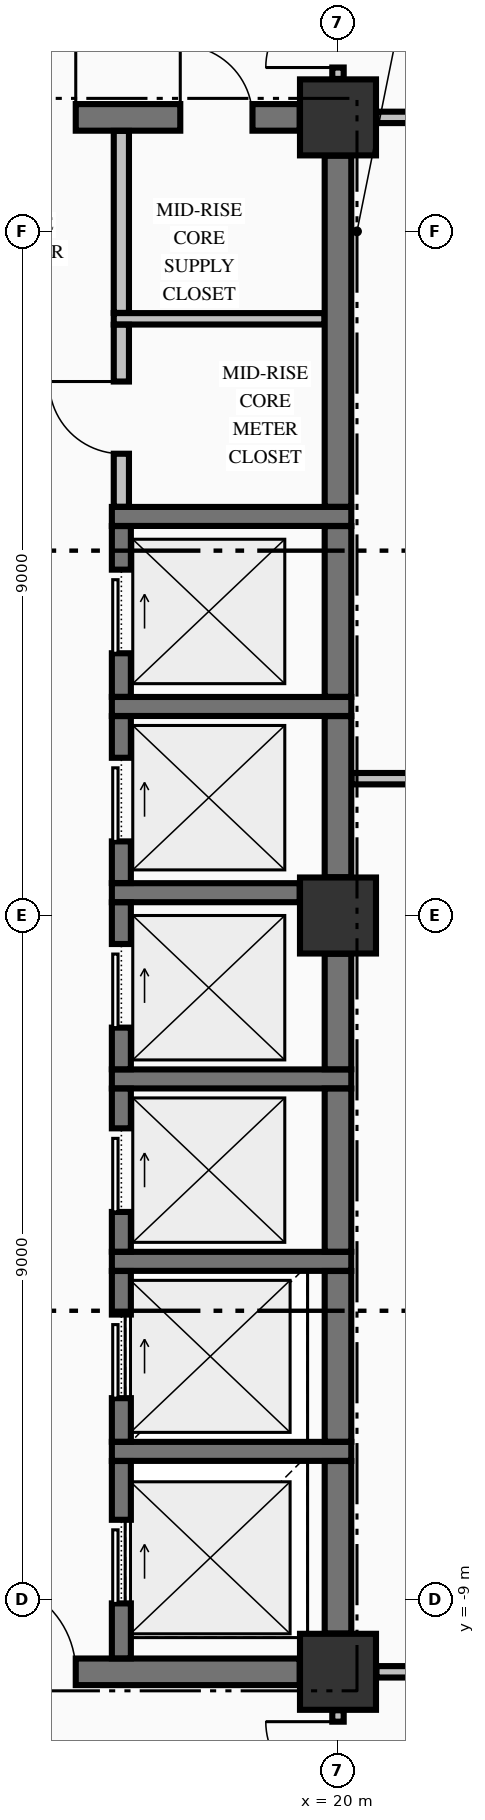
"""IFC4 building model, lengths in metres.
Left out: names, types, materials, properties, quantities, classifications, styles, units other than length and angle.
Written with IfcOpenShell. Run it as: python <this file> out.ifc"""

import sys

from ifc_helpers import new_model, si_unit, direction, frame, frame_2d, origin, origin_2d, place, context, subcontext, project, spatial, rectangle, extrude, element, fill, save


model = new_model("IFC4")
c1 = context("Model", 3, precision=1e-05, world=origin(), true_north=direction((0.0, 1.0)))
c2 = subcontext(c1, "Body", "Model", "MODEL_VIEW")
j1 = project(units=[si_unit("LENGTHUNIT", "METRE"), si_unit("PLANEANGLEUNIT", "RADIAN")], contexts=[c1])
p1 = place(None, origin())
s1 = spatial("IfcSite", under=j1, at=p1, CompositionType="ELEMENT")
p2 = place(p1, origin())
s2 = spatial("IfcBuilding", under=s1, at=p2, CompositionType="ELEMENT")
p3 = place(p2, frame((0.0, 0.0, 86.94)))
s3 = spatial("IfcBuildingStorey", under=s2, at=p3, CompositionType="ELEMENT", Elevation=86.94)
for number, where, z_axis, x_axis in (
    (1, (20.0, -9.95, -0.425), (0.0, 0.0, 1.0), (1.0, 0.0, 0.0)),
    (2, (20.0, 10.5, -0.425), (0.0, 0.0, 1.0), (1.0, 0.0, 0.0)),
    (3, (20.0, 0.0, -0.425), (0.0, 0.0, 1.0), (1.0, 0.0, 0.0)),
):
    element("IfcColumn", number, at=place(p3, frame(where, z_axis=z_axis, x_axis=x_axis)), inside=s3, PredefinedType="COLUMN", context=c2, shape_type="SweptSolid", body=[
        extrude(rectangle(XDim=1.0, YDim=1.0, at=origin_2d()), origin(), (0.0, 0.0, 1.0), 4.595),
    ])
p4 = place(p3, frame((14.7, -9.95, 0.0), z_axis=(0.0, 0.0, 1.0), x_axis=(1.0, 0.0, 0.0)))
e4 = element("IfcWall", 4, at=p4, inside=s3, PredefinedType="SHEAR", context=c2, shape_type="SweptSolid", body=[
    extrude(rectangle(XDim=4.796, YDim=0.35, at=frame_2d((2.398, 0.0))), origin(), (0.0, 0.0, 1.0), 4.17),
])
p5 = place(p4, frame((0.65, 0.0, 0.0)))
e5 = element("IfcOpeningElement", 5, at=p5, cuts=e4, PredefinedType="OPENING", context=c2, shape_type="SweptSolid", body=[
    extrude(rectangle(XDim=1.2, YDim=2.15, at=frame_2d((0.6, 1.075))), frame((0.0, 0.185, 0.0), z_axis=(0.0, -1.0, 0.0), x_axis=(1.0, 0.0, 0.0)), (0.0, 0.0, 1.0), 0.37),
])
for number, where, z_axis, x_axis in (
    (6, (17.025, -7.05, 0.0), (0.0, 0.0, 1.0), (1.0, 0.0, 0.0)),
    (7, (17.025, -4.55, 0.0), (0.0, 0.0, 1.0), (1.0, 0.0, 0.0)),
    (8, (17.025, -2.15, 0.0), (0.0, 0.0, 1.0), (1.0, 0.0, 0.0)),
):
    element("IfcWall", number, at=place(p3, frame(where, z_axis=z_axis, x_axis=x_axis)), inside=s3, PredefinedType="SOLIDWALL", context=c2, shape_type="SweptSolid", body=[
        extrude(rectangle(XDim=3.15, YDim=0.25, at=frame_2d((1.575, 0.0))), origin(), (0.0, 0.0, 1.0), 4.17),
    ])
p6 = place(p3, frame((17.025, 0.3, 0.0), z_axis=(0.0, 0.0, 1.0), x_axis=(1.0, 0.0, 0.0)))
e9 = element("IfcWall", 9, at=p6, inside=s3, PredefinedType="SOLIDWALL", context=c2, shape_type="SweptSolid", body=[
    extrude(rectangle(XDim=2.471, YDim=0.25, at=frame_2d((1.236, 0.0))), origin(), (0.0, 0.0, 1.0), 4.17),
])
for number, where, z_axis, x_axis in (
    (10, (17.025, 2.75, 0.0), (0.0, 0.0, 1.0), (1.0, 0.0, 0.0)),
    (11, (17.025, 5.25, 0.0), (0.0, 0.0, 1.0), (1.0, 0.0, 0.0)),
):
    element("IfcWall", number, at=place(p3, frame(where, z_axis=z_axis, x_axis=x_axis)), inside=s3, PredefinedType="SOLIDWALL", context=c2, shape_type="SweptSolid", body=[
        extrude(rectangle(XDim=3.15, YDim=0.25, at=frame_2d((1.575, 0.0))), origin(), (0.0, 0.0, 1.0), 4.17),
    ])
p7 = place(p3, frame((14.7, 10.5, 0.0), z_axis=(0.0, 0.0, 1.0), x_axis=(1.0, 0.0, 0.0)))
e12 = element("IfcWall", 12, at=p7, inside=s3, PredefinedType="SHEAR", context=c2, shape_type="SweptSolid", body=[
    extrude(rectangle(XDim=4.796, YDim=0.35, at=frame_2d((2.398, 0.0))), origin(), (0.0, 0.0, 1.0), 4.17),
])
p8 = place(p7, frame((0.65, 0.0, 0.0)))
e13 = element("IfcOpeningElement", 13, at=p8, cuts=e12, PredefinedType="OPENING", context=c2, shape_type="SweptSolid", body=[
    extrude(rectangle(XDim=1.2, YDim=2.15, at=frame_2d((0.6, 1.075))), frame((0.0, 0.185, 0.0), z_axis=(0.0, -1.0, 0.0), x_axis=(1.0, 0.0, 0.0)), (0.0, 0.0, 1.0), 0.37),
])
p9 = place(p7, frame((3.225, 0.0, 0.0)))
e14 = element("IfcOpeningElement", 14, at=p9, cuts=e12, PredefinedType="OPENING", context=c2, shape_type="SweptSolid", body=[
    extrude(rectangle(XDim=0.95, YDim=2.15, at=frame_2d((0.475, 1.075))), frame((0.0, 0.185, 0.0), z_axis=(0.0, -1.0, 0.0), x_axis=(1.0, 0.0, 0.0)), (0.0, 0.0, 1.0), 0.37),
])
p10 = place(p3, frame((20.506, -9.95, 0.0), z_axis=(0.0, 0.0, 1.0), x_axis=(1.0, 0.0, 0.0)))
e15 = element("IfcWall", 15, at=p10, inside=s3, PredefinedType="PARTITIONING", context=c2, shape_type="SweptSolid", body=[
    extrude(rectangle(XDim=7.329, YDim=0.15, at=frame_2d((3.665, 0.0))), origin(), (0.0, 0.0, 1.0), 4.17),
])
p11 = place(p10, frame((3.019, 0.0, 0.0)))
e16 = element("IfcOpeningElement", 16, at=p11, cuts=e15, PredefinedType="OPENING", context=c2, shape_type="SweptSolid", body=[
    extrude(rectangle(XDim=0.95, YDim=2.15, at=frame_2d((0.475, 1.075))), frame((0.0, 0.085, 0.0), z_axis=(0.0, -1.0, 0.0), x_axis=(1.0, 0.0, 0.0)), (0.0, 0.0, 1.0), 0.17),
])
p12 = place(p3, frame((20.178, 1.8, 0.0), z_axis=(0.0, 0.0, 1.0), x_axis=(1.0, 0.0, 0.0)))
e17 = element("IfcWall", 17, at=p12, inside=s3, PredefinedType="PARTITIONING", context=c2, shape_type="SweptSolid", body=[
    extrude(rectangle(XDim=7.762, YDim=0.15, at=frame_2d((3.881, 0.0))), origin(), (0.0, 0.0, 1.0), 4.17),
])
p13 = place(p3, frame((17.05, 7.85, 0.0), z_axis=(0.0, 0.0, 1.0), x_axis=(1.0, 0.0, 0.0)))
e18 = element("IfcWall", 18, at=p13, inside=s3, PredefinedType="PARTITIONING", context=c2, shape_type="SweptSolid", body=[
    extrude(rectangle(XDim=2.772, YDim=0.15, at=frame_2d((1.386, 0.0))), origin(), (0.0, 0.0, 1.0), 4.17),
])
p14 = place(p3, frame((20.506, 10.5, 0.0), z_axis=(0.0, 0.0, 1.0), x_axis=(1.0, 0.0, 0.0)))
e19 = element("IfcWall", 19, at=p14, inside=s3, PredefinedType="PARTITIONING", context=c2, shape_type="SweptSolid", body=[
    extrude(rectangle(XDim=7.329, YDim=0.15, at=frame_2d((3.665, 0.0))), origin(), (0.0, 0.0, 1.0), 4.17),
])
p15 = place(p14, frame((3.019, 0.0, 0.0)))
e20 = element("IfcOpeningElement", 20, at=p15, cuts=e19, PredefinedType="OPENING", context=c2, shape_type="SweptSolid", body=[
    extrude(rectangle(XDim=0.95, YDim=2.15, at=frame_2d((0.475, 1.075))), frame((0.0, 0.085, 0.0), z_axis=(0.0, -1.0, 0.0), x_axis=(1.0, 0.0, 0.0)), (0.0, 0.0, 1.0), 0.17),
])
p16 = place(p3, frame((17.15, -9.773, 0.0), z_axis=(0.0, 0.0, 1.0), x_axis=(0.0, 1.0, 0.0)))
e21 = element("IfcWall", 21, at=p16, inside=s3, PredefinedType="SOLIDWALL", context=c2, shape_type="SweptSolid", body=[
    extrude(rectangle(XDim=2.596, YDim=0.25, at=frame_2d((1.298, 0.0))), origin(), (0.0, 0.0, 1.0), 4.17),
])
p17 = place(p16, frame((0.723, 0.0, 0.0)))
e22 = element("IfcOpeningElement", 22, at=p17, cuts=e21, PredefinedType="OPENING", context=c2, shape_type="SweptSolid", body=[
    extrude(rectangle(XDim=1.1, YDim=2.2, at=frame_2d((0.55, 1.1))), frame((0.0, 0.135, 0.0), z_axis=(0.0, -1.0, 0.0), x_axis=(1.0, 0.0, 0.0)), (0.0, 0.0, 1.0), 0.27),
])
p18 = place(p3, frame((17.15, -6.923, 0.0), z_axis=(0.0, 0.0, 1.0), x_axis=(0.0, 1.0, 0.0)))
e23 = element("IfcWall", 23, at=p18, inside=s3, PredefinedType="SOLIDWALL", context=c2, shape_type="SweptSolid", body=[
    extrude(rectangle(XDim=2.246, YDim=0.25, at=frame_2d((1.123, 0.0))), origin(), (0.0, 0.0, 1.0), 4.17),
])
p19 = place(p18, frame((0.573, 0.0, 0.0)))
e24 = element("IfcOpeningElement", 24, at=p19, cuts=e23, PredefinedType="OPENING", context=c2, shape_type="SweptSolid", body=[
    extrude(rectangle(XDim=1.1, YDim=2.2, at=frame_2d((0.55, 1.1))), frame((0.0, 0.135, 0.0), z_axis=(0.0, -1.0, 0.0), x_axis=(1.0, 0.0, 0.0)), (0.0, 0.0, 1.0), 0.27),
])
p20 = place(p3, frame((17.15, -4.423, 0.0), z_axis=(0.0, 0.0, 1.0), x_axis=(0.0, 1.0, 0.0)))
e25 = element("IfcWall", 25, at=p20, inside=s3, PredefinedType="SOLIDWALL", context=c2, shape_type="SweptSolid", body=[
    extrude(rectangle(XDim=2.146, YDim=0.25, at=frame_2d((1.073, 0.0))), origin(), (0.0, 0.0, 1.0), 4.17),
])
p21 = place(p20, frame((0.523, 0.0, 0.0)))
e26 = element("IfcOpeningElement", 26, at=p21, cuts=e25, PredefinedType="OPENING", context=c2, shape_type="SweptSolid", body=[
    extrude(rectangle(XDim=1.1, YDim=2.2, at=frame_2d((0.55, 1.1))), frame((0.0, 0.135, 0.0), z_axis=(0.0, -1.0, 0.0), x_axis=(1.0, 0.0, 0.0)), (0.0, 0.0, 1.0), 0.27),
])
p22 = place(p3, frame((17.15, -2.023, 0.0), z_axis=(0.0, 0.0, 1.0), x_axis=(0.0, 1.0, 0.0)))
e27 = element("IfcWall", 27, at=p22, inside=s3, PredefinedType="SOLIDWALL", context=c2, shape_type="SweptSolid", body=[
    extrude(rectangle(XDim=2.196, YDim=0.25, at=frame_2d((1.098, 0.0))), origin(), (0.0, 0.0, 1.0), 4.17),
])
p23 = place(p22, frame((0.548, 0.0, 0.0)))
e28 = element("IfcOpeningElement", 28, at=p23, cuts=e27, PredefinedType="OPENING", context=c2, shape_type="SweptSolid", body=[
    extrude(rectangle(XDim=1.1, YDim=2.2, at=frame_2d((0.55, 1.1))), frame((0.0, 0.135, 0.0), z_axis=(0.0, -1.0, 0.0), x_axis=(1.0, 0.0, 0.0)), (0.0, 0.0, 1.0), 0.27),
])
p24 = place(p3, frame((17.15, 0.427, 0.0), z_axis=(0.0, 0.0, 1.0), x_axis=(0.0, 1.0, 0.0)))
e29 = element("IfcWall", 29, at=p24, inside=s3, PredefinedType="SOLIDWALL", context=c2, shape_type="SweptSolid", body=[
    extrude(rectangle(XDim=2.196, YDim=0.25, at=frame_2d((1.098, 0.0))), origin(), (0.0, 0.0, 1.0), 4.17),
])
p25 = place(p24, frame((0.548, 0.0, 0.0)))
e30 = element("IfcOpeningElement", 30, at=p25, cuts=e29, PredefinedType="OPENING", context=c2, shape_type="SweptSolid", body=[
    extrude(rectangle(XDim=1.1, YDim=2.2, at=frame_2d((0.55, 1.1))), frame((0.0, 0.135, 0.0), z_axis=(0.0, -1.0, 0.0), x_axis=(1.0, 0.0, 0.0)), (0.0, 0.0, 1.0), 0.27),
])
p26 = place(p3, frame((17.15, 2.877, 0.0), z_axis=(0.0, 0.0, 1.0), x_axis=(0.0, 1.0, 0.0)))
e31 = element("IfcWall", 31, at=p26, inside=s3, PredefinedType="SOLIDWALL", context=c2, shape_type="SweptSolid", body=[
    extrude(rectangle(XDim=2.246, YDim=0.25, at=frame_2d((1.123, 0.0))), origin(), (0.0, 0.0, 1.0), 4.17),
])
p27 = place(p26, frame((0.573, 0.0, 0.0)))
e32 = element("IfcOpeningElement", 32, at=p27, cuts=e31, PredefinedType="OPENING", context=c2, shape_type="SweptSolid", body=[
    extrude(rectangle(XDim=1.1, YDim=2.2, at=frame_2d((0.55, 1.1))), frame((0.0, 0.135, 0.0), z_axis=(0.0, -1.0, 0.0), x_axis=(1.0, 0.0, 0.0)), (0.0, 0.0, 1.0), 0.27),
])
p28 = place(p3, frame((20.0, -9.446, 0.0), z_axis=(0.0, 0.0, 1.0), x_axis=(0.0, 1.0, 0.0)))
e33 = element("IfcWall", 33, at=p28, inside=s3, PredefinedType="SHEAR", context=c2, shape_type="SweptSolid", body=[
    extrude(rectangle(XDim=2.269, YDim=0.35, at=frame_2d((1.135, 0.0))), origin(), (0.0, 0.0, 1.0), 4.17),
])
p29 = place(p3, frame((20.0, -6.923, 0.0), z_axis=(0.0, 0.0, 1.0), x_axis=(0.0, 1.0, 0.0)))
e34 = element("IfcWall", 34, at=p29, inside=s3, PredefinedType="SHEAR", context=c2, shape_type="SweptSolid", body=[
    extrude(rectangle(XDim=2.246, YDim=0.35, at=frame_2d((1.123, 0.0))), origin(), (0.0, 0.0, 1.0), 4.17),
])
p30 = place(p3, frame((20.0, -4.423, 0.0), z_axis=(0.0, 0.0, 1.0), x_axis=(0.0, 1.0, 0.0)))
e35 = element("IfcWall", 35, at=p30, inside=s3, PredefinedType="SHEAR", context=c2, shape_type="SweptSolid", body=[
    extrude(rectangle(XDim=2.146, YDim=0.35, at=frame_2d((1.073, 0.0))), origin(), (0.0, 0.0, 1.0), 4.17),
])
p31 = place(p3, frame((20.0, -2.023, 0.0), z_axis=(0.0, 0.0, 1.0), x_axis=(0.0, 1.0, 0.0)))
e36 = element("IfcWall", 36, at=p31, inside=s3, PredefinedType="SHEAR", context=c2, shape_type="SweptSolid", body=[
    extrude(rectangle(XDim=1.519, YDim=0.35, at=frame_2d((0.76, 0.0))), origin(), (0.0, 0.0, 1.0), 4.17),
])
p32 = place(p3, frame((20.0, 0.504, 0.0), z_axis=(0.0, 0.0, 1.0), x_axis=(0.0, 1.0, 0.0)))
e37 = element("IfcWall", 37, at=p32, inside=s3, PredefinedType="SHEAR", context=c2, shape_type="SweptSolid", body=[
    extrude(rectangle(XDim=2.119, YDim=0.35, at=frame_2d((1.06, 0.0))), origin(), (0.0, 0.0, 1.0), 4.17),
])
p33 = place(p3, frame((20.0, 2.877, 0.0), z_axis=(0.0, 0.0, 1.0), x_axis=(0.0, 1.0, 0.0)))
e38 = element("IfcWall", 38, at=p33, inside=s3, PredefinedType="SHEAR", context=c2, shape_type="SweptSolid", body=[
    extrude(rectangle(XDim=2.246, YDim=0.35, at=frame_2d((1.123, 0.0))), origin(), (0.0, 0.0, 1.0), 4.17),
])
p34 = place(p3, frame((20.0, 5.377, 0.0), z_axis=(0.0, 0.0, 1.0), x_axis=(0.0, 1.0, 0.0)))
e39 = element("IfcWall", 39, at=p34, inside=s3, PredefinedType="SHEAR", context=c2, shape_type="SweptSolid", body=[
    extrude(rectangle(XDim=4.619, YDim=0.35, at=frame_2d((2.31, 0.0))), origin(), (0.0, 0.0, 1.0), 4.17),
])
p35 = place(p3, frame((17.15, 5.378, 0.0), z_axis=(0.0, 0.0, 1.0), x_axis=(0.0, 1.0, 0.0)))
e40 = element("IfcWall", 40, at=p35, inside=s3, PredefinedType="PARTITIONING", context=c2, shape_type="SweptSolid", body=[
    extrude(rectangle(XDim=2.394, YDim=0.2, at=frame_2d((1.197, 0.0))), origin(), (0.0, 0.0, 1.0), 4.17),
])
p36 = place(p35, frame((0.697, 0.0, 0.0)))
e41 = element("IfcOpeningElement", 41, at=p36, cuts=e40, PredefinedType="OPENING", context=c2, shape_type="SweptSolid", body=[
    extrude(rectangle(XDim=0.95, YDim=2.15, at=frame_2d((0.475, 1.075))), frame((0.0, 0.11, 0.0), z_axis=(0.0, -1.0, 0.0), x_axis=(1.0, 0.0, 0.0)), (0.0, 0.0, 1.0), 0.22),
])
p37 = place(p3, frame((17.15, 7.928, 0.0), z_axis=(0.0, 0.0, 1.0), x_axis=(0.0, 1.0, 0.0)))
e42 = element("IfcWall", 42, at=p37, inside=s3, PredefinedType="PARTITIONING", context=c2, shape_type="SweptSolid", body=[
    extrude(rectangle(XDim=2.394, YDim=0.2, at=frame_2d((1.197, 0.0))), origin(), (0.0, 0.0, 1.0), 4.17),
])
p38 = place(p3, frame((20.0, -12.122, 0.0), z_axis=(0.0, 0.0, 1.0), x_axis=(0.0, 1.0, 0.0)))
e43 = element("IfcWall", 43, at=p38, inside=s3, PredefinedType="PARTITIONING", context=c2, shape_type="SweptSolid", body=[
    extrude(rectangle(XDim=1.666, YDim=0.15, at=frame_2d((0.833, 0.0))), origin(), (0.0, 0.0, 1.0), 3.36),
])
p39 = place(p38, frame((0.566, 0.0, 0.0)))
e44 = element("IfcOpeningElement", 44, at=p39, cuts=e43, PredefinedType="OPENING", context=c2, shape_type="SweptSolid", body=[
    extrude(rectangle(XDim=0.95, YDim=2.15, at=frame_2d((0.475, 1.075))), frame((0.0, 0.085, 0.0), z_axis=(0.0, -1.0, 0.0), x_axis=(1.0, 0.0, 0.0)), (0.0, 0.0, 1.0), 0.17),
])
p40 = place(p3, frame((20.0, 11.006, 0.0), z_axis=(0.0, 0.0, 1.0), x_axis=(0.0, 1.0, 0.0)))
e45 = element("IfcWall", 45, at=p40, inside=s3, PredefinedType="PARTITIONING", context=c2, shape_type="SweptSolid", body=[
    extrude(rectangle(XDim=1.466, YDim=0.15, at=frame_2d((0.733, 0.0))), origin(), (0.0, 0.0, 1.0), 3.36),
])
p41 = place(p40, frame((0.15, 0.0, 0.0)))
e46 = element("IfcOpeningElement", 46, at=p41, cuts=e45, PredefinedType="OPENING", context=c2, shape_type="SweptSolid", body=[
    extrude(rectangle(XDim=0.95, YDim=2.15, at=frame_2d((0.475, 1.075))), frame((0.0, 0.085, 0.0), z_axis=(0.0, -1.0, 0.0), x_axis=(1.0, 0.0, 0.0)), (0.0, 0.0, 1.0), 0.17),
])
p42 = place(p17, origin())
e47 = element("IfcDoor", 47, at=p42, inside=s3, OperationType="SLIDING_TO_RIGHT", PredefinedType="DOOR", context=c2, shape_type="SweptSolid", body=[
    extrude(rectangle(XDim=1.1, YDim=2.2, at=frame_2d((0.55, 1.1))), frame((0.0, 0.025, 0.0), z_axis=(0.0, -1.0, 0.0), x_axis=(1.0, 0.0, 0.0)), (0.0, 0.0, 1.0), 0.05),
])
fill(e22, e47)
p43 = place(p19, origin())
e48 = element("IfcDoor", 48, at=p43, inside=s3, OperationType="SLIDING_TO_RIGHT", PredefinedType="DOOR", context=c2, shape_type="SweptSolid", body=[
    extrude(rectangle(XDim=1.1, YDim=2.2, at=frame_2d((0.55, 1.1))), frame((0.0, 0.025, 0.0), z_axis=(0.0, -1.0, 0.0), x_axis=(1.0, 0.0, 0.0)), (0.0, 0.0, 1.0), 0.05),
])
fill(e24, e48)
p44 = place(p21, origin())
e49 = element("IfcDoor", 49, at=p44, inside=s3, OperationType="SLIDING_TO_RIGHT", PredefinedType="DOOR", context=c2, shape_type="SweptSolid", body=[
    extrude(rectangle(XDim=1.1, YDim=2.2, at=frame_2d((0.55, 1.1))), frame((0.0, 0.025, 0.0), z_axis=(0.0, -1.0, 0.0), x_axis=(1.0, 0.0, 0.0)), (0.0, 0.0, 1.0), 0.05),
])
fill(e26, e49)
p45 = place(p23, origin())
e50 = element("IfcDoor", 50, at=p45, inside=s3, OperationType="SLIDING_TO_RIGHT", PredefinedType="DOOR", context=c2, shape_type="SweptSolid", body=[
    extrude(rectangle(XDim=1.1, YDim=2.2, at=frame_2d((0.55, 1.1))), frame((0.0, 0.025, 0.0), z_axis=(0.0, -1.0, 0.0), x_axis=(1.0, 0.0, 0.0)), (0.0, 0.0, 1.0), 0.05),
])
fill(e28, e50)
p46 = place(p25, origin())
e51 = element("IfcDoor", 51, at=p46, inside=s3, OperationType="SLIDING_TO_RIGHT", PredefinedType="DOOR", context=c2, shape_type="SweptSolid", body=[
    extrude(rectangle(XDim=1.1, YDim=2.2, at=frame_2d((0.55, 1.1))), frame((0.0, 0.025, 0.0), z_axis=(0.0, -1.0, 0.0), x_axis=(1.0, 0.0, 0.0)), (0.0, 0.0, 1.0), 0.05),
])
fill(e30, e51)
p47 = place(p27, origin())
e52 = element("IfcDoor", 52, at=p47, inside=s3, OperationType="SLIDING_TO_RIGHT", PredefinedType="DOOR", context=c2, shape_type="SweptSolid", body=[
    extrude(rectangle(XDim=1.1, YDim=2.2, at=frame_2d((0.55, 1.1))), frame((0.0, 0.025, 0.0), z_axis=(0.0, -1.0, 0.0), x_axis=(1.0, 0.0, 0.0)), (0.0, 0.0, 1.0), 0.05),
])
fill(e32, e52)
p48 = place(p5, origin())
e53 = element("IfcDoor", 53, at=p48, inside=s3, OperationType="SINGLE_SWING_LEFT", PredefinedType="DOOR", context=c2, shape_type="SweptSolid", body=[
    extrude(rectangle(XDim=1.2, YDim=2.15, at=frame_2d((0.6, 1.075))), frame((0.0, 0.025, 0.0), z_axis=(0.0, -1.0, 0.0), x_axis=(1.0, 0.0, 0.0)), (0.0, 0.0, 1.0), 0.05),
])
fill(e5, e53)
p49 = place(p8, origin())
e54 = element("IfcDoor", 54, at=p49, inside=s3, OperationType="SINGLE_SWING_RIGHT", PredefinedType="DOOR", context=c2, shape_type="SweptSolid", body=[
    extrude(rectangle(XDim=1.2, YDim=2.15, at=frame_2d((0.6, 1.075))), frame((0.0, 0.025, 0.0), z_axis=(0.0, -1.0, 0.0), x_axis=(1.0, 0.0, 0.0)), (0.0, 0.0, 1.0), 0.05),
])
fill(e13, e54)
p50 = place(p9, origin())
e55 = element("IfcDoor", 55, at=p50, inside=s3, OperationType="SINGLE_SWING_LEFT", PredefinedType="DOOR", context=c2, shape_type="SweptSolid", body=[
    extrude(rectangle(XDim=0.95, YDim=2.15, at=frame_2d((0.475, 1.075))), frame((0.0, 0.025, 0.0), z_axis=(0.0, -1.0, 0.0), x_axis=(1.0, 0.0, 0.0)), (0.0, 0.0, 1.0), 0.05),
])
fill(e14, e55)
p51 = place(p36, origin())
e56 = element("IfcDoor", 56, at=p51, inside=s3, OperationType="SINGLE_SWING_RIGHT", PredefinedType="DOOR", context=c2, shape_type="SweptSolid", body=[
    extrude(rectangle(XDim=0.95, YDim=2.15, at=frame_2d((0.475, 1.075))), frame((0.0, 0.025, 0.0), z_axis=(0.0, -1.0, 0.0), x_axis=(1.0, 0.0, 0.0)), (0.0, 0.0, 1.0), 0.05),
])
fill(e41, e56)
p52 = place(p41, origin())
e57 = element("IfcDoor", 57, at=p52, inside=s3, OperationType="SINGLE_SWING_LEFT", PredefinedType="DOOR", context=c2, shape_type="SweptSolid", body=[
    extrude(rectangle(XDim=0.95, YDim=2.15, at=frame_2d((0.475, 1.075))), frame((0.0, 0.025, 0.0), z_axis=(0.0, -1.0, 0.0), x_axis=(1.0, 0.0, 0.0)), (0.0, 0.0, 1.0), 0.05),
])
fill(e46, e57)
p53 = place(p39, origin())
e58 = element("IfcDoor", 58, at=p53, inside=s3, OperationType="SINGLE_SWING_RIGHT", PredefinedType="DOOR", context=c2, shape_type="SweptSolid", body=[
    extrude(rectangle(XDim=0.95, YDim=2.15, at=frame_2d((0.475, 1.075))), frame((0.0, 0.025, 0.0), z_axis=(0.0, -1.0, 0.0), x_axis=(1.0, 0.0, 0.0)), (0.0, 0.0, 1.0), 0.05),
])
fill(e44, e58)
save(model, sys.argv[1])
